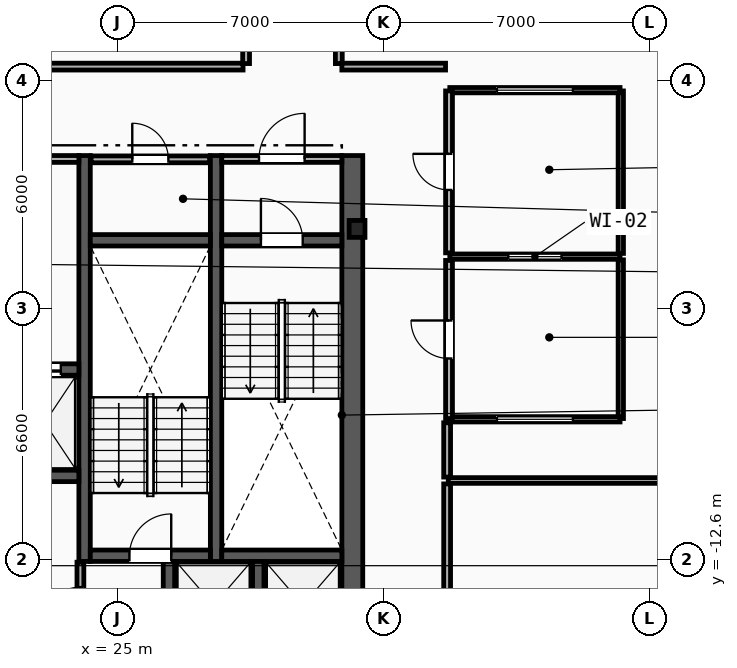
"""IFC4 building model, lengths in metres.
Left out: names, types, materials, properties, quantities, classifications, styles, units other than length and angle.
Written with IfcOpenShell. Run it as: python <this file> out.ifc"""

import sys

from ifc_helpers import new_model, si_unit, direction, frame, frame_2d, origin, origin_2d, place, context, subcontext, project, spatial, rectangle, i_section, extrude, element, fill, save


model = new_model("IFC4")
c1 = context("Model", 3, precision=1e-05, world=origin(), true_north=direction((0.0, 1.0)))
c2 = subcontext(c1, "Body", "Model", "MODEL_VIEW")
j1 = project(units=[si_unit("LENGTHUNIT", "METRE"), si_unit("PLANEANGLEUNIT", "RADIAN")], contexts=[c1])
p1 = place(None, origin())
s1 = spatial("IfcSite", under=j1, at=p1, CompositionType="ELEMENT")
p2 = place(p1, origin())
s2 = spatial("IfcBuilding", under=s1, at=p2, CompositionType="ELEMENT")
p3 = place(p2, frame((0.0, 0.0, 257.6)))
s3 = spatial("IfcBuildingStorey", under=s2, at=p3, CompositionType="ELEMENT", Elevation=257.6)
p4 = place(p3, frame((31.3, -3.9, 0.0), z_axis=(0.0, 0.0, 1.0), x_axis=(1.0, 0.0, 0.0)))
e1 = element("IfcColumn", 1, at=p4, inside=s3, PredefinedType="COLUMN", context=c2, shape_type="SweptSolid", body=[
    extrude(i_section(OverallWidth=0.416, OverallDepth=0.446, WebThickness=0.039, FlangeThickness=0.063, FilletRadius=0.018, at=origin_2d()), origin(), (0.0, 0.0, 1.0), 3.6),
])
p5 = place(p3, frame((31.175, -15.3, 0.0), z_axis=(0.0, 0.0, 1.0), x_axis=(0.0, 1.0, 0.0)))
e2 = element("IfcWall", 2, at=p5, inside=s3, PredefinedType="SHEAR", context=c2, shape_type="SweptSolid", body=[
    extrude(rectangle(XDim=13.33, YDim=0.55, at=frame_2d((6.665, 0.0))), origin(), (0.0, 0.0, 1.0), 3.34),
])
for number, where, z_axis, x_axis in (
    (3, (27.59, -12.65, 0.0), (0.0, 0.0, 1.0), (0.0, 1.0, 0.0)),
    (4, (24.13, -12.65, 0.0), (0.0, 0.0, 1.0), (0.0, 1.0, 0.0)),
):
    element("IfcWall", number, at=place(p3, frame(where, z_axis=z_axis, x_axis=x_axis)), inside=s3, PredefinedType="SHEAR", context=c2, shape_type="SweptSolid", body=[
        extrude(rectangle(XDim=10.68, YDim=0.3, at=frame_2d((5.34, 0.0))), origin(), (0.0, 0.0, 1.0), 3.34),
    ])
p6 = place(p3, frame((27.74, -4.2, 0.0), z_axis=(0.0, 0.0, 1.0), x_axis=(1.0, 0.0, 0.0)))
e5 = element("IfcWall", 5, at=p6, inside=s3, PredefinedType="SHEAR", context=c2, shape_type="SweptSolid", body=[
    extrude(rectangle(XDim=3.16, YDim=0.3, at=frame_2d((1.58, 0.0))), origin(), (0.0, 0.0, 1.0), 3.34),
])
p7 = place(p6, frame((1.03, 0.0, 0.0)))
e6 = element("IfcOpeningElement", 6, at=p7, cuts=e5, PredefinedType="OPENING", context=c2, shape_type="SweptSolid", body=[
    extrude(rectangle(XDim=1.1, YDim=2.15, at=frame_2d((0.55, 1.075))), frame((0.0, 0.16, 0.0), z_axis=(0.0, -1.0, 0.0), x_axis=(1.0, 0.0, 0.0)), (0.0, 0.0, 1.0), 0.32),
])
p8 = place(p3, frame((27.74, -12.5, 0.0), z_axis=(0.0, 0.0, 1.0), x_axis=(1.0, 0.0, 0.0)))
e7 = element("IfcWall", 7, at=p8, inside=s3, PredefinedType="SHEAR", context=c2, shape_type="SweptSolid", body=[
    extrude(rectangle(XDim=3.16, YDim=0.3, at=frame_2d((1.58, 0.0))), origin(), (0.0, 0.0, 1.0), 3.34),
])
p9 = place(p3, frame((24.28, -12.5, 0.0), z_axis=(0.0, 0.0, 1.0), x_axis=(1.0, 0.0, 0.0)))
e8 = element("IfcWall", 8, at=p9, inside=s3, PredefinedType="SHEAR", context=c2, shape_type="SweptSolid", body=[
    extrude(rectangle(XDim=3.16, YDim=0.3, at=frame_2d((1.58, 0.0))), origin(), (0.0, 0.0, 1.0), 3.34),
])
p10 = place(p9, frame((1.03, 0.0, 0.0)))
e9 = element("IfcOpeningElement", 9, at=p10, cuts=e8, PredefinedType="OPENING", context=c2, shape_type="SweptSolid", body=[
    extrude(rectangle(XDim=1.1, YDim=2.15, at=frame_2d((0.55, 1.075))), frame((0.0, 0.16, 0.0), z_axis=(0.0, -1.0, 0.0), x_axis=(1.0, 0.0, 0.0)), (0.0, 0.0, 1.0), 0.32),
])
p11 = place(p3, frame((24.28, -4.2, 0.0), z_axis=(0.0, 0.0, 1.0), x_axis=(1.0, 0.0, 0.0)))
e10 = element("IfcWall", 10, at=p11, inside=s3, PredefinedType="SHEAR", context=c2, shape_type="SweptSolid", body=[
    extrude(rectangle(XDim=3.16, YDim=0.3, at=frame_2d((1.58, 0.0))), origin(), (0.0, 0.0, 1.0), 3.34),
])
p12 = place(p3, frame((20.98, -2.06, 0.0), z_axis=(0.0, 0.0, 1.0), x_axis=(1.0, 0.0, 0.0)))
e11 = element("IfcWall", 11, at=p12, inside=s3, PredefinedType="PARTITIONING", context=c2, shape_type="SweptSolid", body=[
    extrude(rectangle(XDim=3.0, YDim=0.18, at=frame_2d((1.5, 0.0))), origin(), (0.0, 0.0, 1.0), 3.34),
])
p13 = place(p12, frame((0.9, 0.0, 0.0)))
e12 = element("IfcOpeningElement", 12, at=p13, cuts=e11, PredefinedType="OPENING", context=c2, shape_type="SweptSolid", body=[
    extrude(rectangle(XDim=1.2, YDim=2.15, at=frame_2d((0.6, 1.075))), frame((0.0, 0.1, 0.0), z_axis=(0.0, -1.0, 0.0), x_axis=(1.0, 0.0, 0.0)), (0.0, 0.0, 1.0), 0.2),
])
p14 = place(p3, frame((27.74, -2.06, 0.0), z_axis=(0.0, 0.0, 1.0), x_axis=(1.0, 0.0, 0.0)))
e13 = element("IfcWall", 13, at=p14, inside=s3, PredefinedType="PARTITIONING", context=c2, shape_type="SweptSolid", body=[
    extrude(rectangle(XDim=3.16, YDim=0.18, at=frame_2d((1.58, 0.0))), origin(), (0.0, 0.0, 1.0), 3.34),
])
p15 = place(p14, frame((0.98, 0.0, 0.0)))
e14 = element("IfcOpeningElement", 14, at=p15, cuts=e13, PredefinedType="OPENING", context=c2, shape_type="SweptSolid", body=[
    extrude(rectangle(XDim=1.2, YDim=2.15, at=frame_2d((0.6, 1.075))), frame((0.0, 0.1, 0.0), z_axis=(0.0, -1.0, 0.0), x_axis=(1.0, 0.0, 0.0)), (0.0, 0.0, 1.0), 0.2),
])
p16 = place(p3, frame((21.88, -7.6, 0.0), z_axis=(0.0, 0.0, 1.0), x_axis=(1.0, 0.0, 0.0)))
e15 = element("IfcWall", 15, at=p16, inside=s3, PredefinedType="SHEAR", context=c2, shape_type="SweptSolid", body=[
    extrude(rectangle(XDim=2.1, YDim=0.3, at=frame_2d((1.05, 0.0))), origin(), (0.0, 0.0, 1.0), 3.34),
])
p17 = place(p16, frame((0.475, 0.0, 0.0)))
e16 = element("IfcOpeningElement", 16, at=p17, cuts=e15, PredefinedType="OPENING", context=c2, shape_type="SweptSolid", body=[
    extrude(rectangle(XDim=1.15, YDim=2.2, at=frame_2d((0.575, 1.1))), frame((0.0, 0.16, 0.0), z_axis=(0.0, -1.0, 0.0), x_axis=(1.0, 0.0, 0.0)), (0.0, 0.0, 1.0), 0.32),
])
p18 = place(p3, frame((21.88, -10.4, 0.0), z_axis=(0.0, 0.0, 1.0), x_axis=(1.0, 0.0, 0.0)))
e17 = element("IfcWall", 17, at=p18, inside=s3, PredefinedType="SHEAR", context=c2, shape_type="SweptSolid", body=[
    extrude(rectangle(XDim=2.1, YDim=0.3, at=frame_2d((1.05, 0.0))), origin(), (0.0, 0.0, 1.0), 3.34),
])
for number, where, z_axis, x_axis in (
    (18, (28.7, -14.95, 0.0), (0.0, 0.0, 1.0), (0.0, 1.0, 0.0)),
    (19, (26.35, -14.95, 0.0), (0.0, 0.0, 1.0), (0.0, 1.0, 0.0)),
):
    element("IfcWall", number, at=place(p3, frame(where, z_axis=z_axis, x_axis=x_axis)), inside=s3, PredefinedType="SHEAR", context=c2, shape_type="SweptSolid", body=[
        extrude(rectangle(XDim=2.3, YDim=0.3, at=frame_2d((1.15, 0.0))), origin(), (0.0, 0.0, 1.0), 3.34),
    ])
p19 = place(p3, frame((24.3, -2.07, 0.0), z_axis=(0.0, 0.0, 1.0), x_axis=(1.0, 0.0, 0.0)))
e20 = element("IfcWall", 20, at=p19, inside=s3, PredefinedType="PARTITIONING", context=c2, shape_type="SweptSolid", body=[
    extrude(rectangle(XDim=3.12, YDim=0.18, at=frame_2d((1.56, 0.0))), origin(), (0.0, 0.0, 1.0), 3.34),
])
p20 = place(p19, frame((1.085, 0.0, 0.0)))
e21 = element("IfcOpeningElement", 21, at=p20, cuts=e20, PredefinedType="OPENING", context=c2, shape_type="SweptSolid", body=[
    extrude(rectangle(XDim=0.95, YDim=2.1, at=frame_2d((0.475, 1.05))), frame((0.0, 0.1, 0.0), z_axis=(0.0, -1.0, 0.0), x_axis=(1.0, 0.0, 0.0)), (0.0, 0.0, 1.0), 0.2),
])
p21 = place(p3, frame((24.02, -14.93, 0.0), z_axis=(0.0, 0.0, 1.0), x_axis=(0.0, 1.0, 0.0)))
e22 = element("IfcWall", 22, at=p21, inside=s3, PredefinedType="PARTITIONING", context=c2, shape_type="SweptSolid", body=[
    extrude(rectangle(XDim=2.26, YDim=0.18, at=frame_2d((1.13, 0.0))), origin(), (0.0, 0.0, 1.0), 3.34),
])
p22 = place(p21, frame((0.655, 0.0, 0.0)))
e23 = element("IfcOpeningElement", 23, at=p22, cuts=e22, PredefinedType="OPENING", context=c2, shape_type="SweptSolid", body=[
    extrude(rectangle(XDim=0.95, YDim=2.1, at=frame_2d((0.475, 1.05))), frame((0.0, 0.1, 0.0), z_axis=(0.0, -1.0, 0.0), x_axis=(1.0, 0.0, 0.0)), (0.0, 0.0, 1.0), 0.2),
])
p23 = place(p3, frame((38.24, -8.89, 0.0), z_axis=(0.0, 0.0, 1.0), x_axis=(0.0, 1.0, 0.0)))
e24 = element("IfcWall", 24, at=p23, inside=s3, PredefinedType="PARTITIONING", context=c2, shape_type="SweptSolid", body=[
    extrude(rectangle(XDim=4.175, YDim=0.14, at=frame_2d((2.087, 0.0))), origin(), (0.0, 0.0, 1.0), 3.34),
])
p24 = place(p3, frame((38.24, -4.545, 0.0), z_axis=(0.0, 0.0, 1.0), x_axis=(0.0, 1.0, 0.0)))
e25 = element("IfcWall", 25, at=p24, inside=s3, PredefinedType="PARTITIONING", context=c2, shape_type="SweptSolid", body=[
    extrude(rectangle(XDim=4.275, YDim=0.14, at=frame_2d((2.137, 0.0))), origin(), (0.0, 0.0, 1.0), 3.34),
])
p25 = place(p3, frame((33.74, -0.25, 0.0), z_axis=(0.0, 0.0, 1.0), x_axis=(1.0, 0.0, 0.0)))
e26 = element("IfcWall", 26, at=p25, inside=s3, PredefinedType="PARTITIONING", context=c2, shape_type="SweptSolid", body=[
    extrude(rectangle(XDim=4.48, YDim=0.14, at=frame_2d((2.24, 0.0))), origin(), (0.0, 0.0, 1.0), 3.34),
])
p26 = place(p25, frame((1.24, 0.0, 1.05)))
e27 = element("IfcOpeningElement", 27, at=p26, cuts=e26, PredefinedType="OPENING", context=c2, shape_type="SweptSolid", body=[
    extrude(rectangle(XDim=2.0, YDim=1.5, at=frame_2d((1.0, 0.75))), frame((0.0, 0.08, 0.0), z_axis=(0.0, -1.0, 0.0), x_axis=(1.0, 0.0, 0.0)), (0.0, 0.0, 1.0), 0.16),
])
p27 = place(p3, frame((33.74, -4.63, 0.0), z_axis=(0.0, 0.0, 1.0), x_axis=(1.0, 0.0, 0.0)))
e28 = element("IfcWall", 28, at=p27, inside=s3, PredefinedType="PARTITIONING", context=c2, shape_type="SweptSolid", body=[
    extrude(rectangle(XDim=4.48, YDim=0.14, at=frame_2d((2.24, 0.0))), origin(), (0.0, 0.0, 1.0), 3.34),
])
p28 = place(p27, frame((1.54, 0.0, 1.05)))
e29 = element("IfcOpeningElement", 29, at=p28, cuts=e28, PredefinedType="OPENING", context=c2, shape_type="SweptSolid", body=[
    extrude(rectangle(XDim=1.4, YDim=1.5, at=frame_2d((0.7, 0.75))), frame((0.0, 0.08, 0.0), z_axis=(0.0, -1.0, 0.0), x_axis=(1.0, 0.0, 0.0)), (0.0, 0.0, 1.0), 0.16),
])
p29 = place(p3, frame((33.74, -8.91, 0.0), z_axis=(0.0, 0.0, 1.0), x_axis=(1.0, 0.0, 0.0)))
e30 = element("IfcWall", 30, at=p29, inside=s3, PredefinedType="PARTITIONING", context=c2, shape_type="SweptSolid", body=[
    extrude(rectangle(XDim=4.48, YDim=0.14, at=frame_2d((2.24, 0.0))), origin(), (0.0, 0.0, 1.0), 3.34),
])
p30 = place(p29, frame((1.24, 0.0, 1.05)))
e31 = element("IfcOpeningElement", 31, at=p30, cuts=e30, PredefinedType="OPENING", context=c2, shape_type="SweptSolid", body=[
    extrude(rectangle(XDim=2.0, YDim=1.5, at=frame_2d((1.0, 0.75))), frame((0.0, 0.08, 0.0), z_axis=(0.0, -1.0, 0.0), x_axis=(1.0, 0.0, 0.0)), (0.0, 0.0, 1.0), 0.16),
])
p31 = place(p3, frame((33.72, -4.53, 0.0), z_axis=(0.0, 0.0, 1.0), x_axis=(0.0, 1.0, 0.0)))
e32 = element("IfcWall", 32, at=p31, inside=s3, PredefinedType="PARTITIONING", context=c2, shape_type="SweptSolid", body=[
    extrude(rectangle(XDim=4.26, YDim=0.18, at=frame_2d((2.13, 0.0))), origin(), (0.0, 0.0, 1.0), 3.34),
])
p32 = place(p31, frame((1.655, 0.0, 0.0)))
e33 = element("IfcOpeningElement", 33, at=p32, cuts=e32, PredefinedType="OPENING", context=c2, shape_type="SweptSolid", body=[
    extrude(rectangle(XDim=0.95, YDim=2.1, at=frame_2d((0.475, 1.05))), frame((0.0, 0.1, 0.0), z_axis=(0.0, -1.0, 0.0), x_axis=(1.0, 0.0, 0.0)), (0.0, 0.0, 1.0), 0.2),
])
p33 = place(p3, frame((33.72, -8.89, 0.0), z_axis=(0.0, 0.0, 1.0), x_axis=(0.0, 1.0, 0.0)))
e34 = element("IfcWall", 34, at=p33, inside=s3, PredefinedType="PARTITIONING", context=c2, shape_type="SweptSolid", body=[
    extrude(rectangle(XDim=4.16, YDim=0.18, at=frame_2d((2.08, 0.0))), origin(), (0.0, 0.0, 1.0), 3.34),
])
p34 = place(p33, frame((1.58, 0.0, 0.0)))
e35 = element("IfcOpeningElement", 35, at=p34, cuts=e34, PredefinedType="OPENING", context=c2, shape_type="SweptSolid", body=[
    extrude(rectangle(XDim=1.0, YDim=2.15, at=frame_2d((0.5, 1.075))), frame((0.0, 0.1, 0.0), z_axis=(0.0, -1.0, 0.0), x_axis=(1.0, 0.0, 0.0)), (0.0, 0.0, 1.0), 0.2),
])
p35 = place(p3, frame((33.7, -10.52, 0.0), z_axis=(0.0, 0.0, 1.0), x_axis=(1.0, 0.0, 0.0)))
e36 = element("IfcWall", 36, at=p35, inside=s3, PredefinedType="PARTITIONING", context=c2, shape_type="SweptSolid", body=[
    extrude(rectangle(XDim=16.444, YDim=0.15, at=frame_2d((8.222, 0.0))), origin(), (0.0, 0.0, 1.0), 3.34),
])
p36 = place(p3, frame((33.67, -17.428, 0.0), z_axis=(0.0, 0.0, 1.0), x_axis=(0.0, 1.0, 0.0)))
e37 = element("IfcWall", 37, at=p36, inside=s3, PredefinedType="PARTITIONING", context=c2, shape_type="SweptSolid", body=[
    extrude(rectangle(XDim=6.818, YDim=0.18, at=frame_2d((3.409, 0.0))), origin(), (0.0, 0.0, 1.0), 3.34),
])
p37 = place(p36, frame((2.909, 0.0, 0.0)))
e38 = element("IfcOpeningElement", 38, at=p37, cuts=e37, PredefinedType="OPENING", context=c2, shape_type="SweptSolid", body=[
    extrude(rectangle(XDim=1.0, YDim=2.15, at=frame_2d((0.5, 1.075))), frame((0.0, 0.1, 0.0), z_axis=(0.0, -1.0, 0.0), x_axis=(1.0, 0.0, 0.0)), (0.0, 0.0, 1.0), 0.2),
])
p38 = place(p3, frame((30.82, 0.45, 0.0), z_axis=(0.0, 0.0, 1.0), x_axis=(0.0, 1.0, 0.0)))
e39 = element("IfcWall", 39, at=p38, inside=s3, PredefinedType="PARTITIONING", context=c2, shape_type="SweptSolid", body=[
    extrude(rectangle(XDim=9.54, YDim=0.18, at=frame_2d((4.77, 0.0))), origin(), (0.0, 0.0, 1.0), 3.34),
])
p39 = place(p38, frame((4.27, 0.0, 0.0)))
e40 = element("IfcOpeningElement", 40, at=p39, cuts=e39, PredefinedType="OPENING", context=c2, shape_type="SweptSolid", body=[
    extrude(rectangle(XDim=1.0, YDim=2.15, at=frame_2d((0.5, 1.075))), frame((0.0, 0.1, 0.0), z_axis=(0.0, -1.0, 0.0), x_axis=(1.0, 0.0, 0.0)), (0.0, 0.0, 1.0), 0.2),
])
p40 = place(p3, frame((33.628, 0.37, 0.0), z_axis=(0.0, 0.0, 1.0), x_axis=(-1.0, 0.0, 0.0)))
e41 = element("IfcWall", 41, at=p40, inside=s3, PredefinedType="PARTITIONING", context=c2, shape_type="SweptSolid", body=[
    extrude(rectangle(XDim=2.729, YDim=0.18, at=frame_2d((1.364, 0.0))), origin(), (0.0, 0.0, 1.0), 3.34),
])
p41 = place(p3, frame((33.67, -10.43, 0.0), z_axis=(0.0, 0.0, 1.0), x_axis=(0.0, 1.0, 0.0)))
e42 = element("IfcWall", 42, at=p41, inside=s3, PredefinedType="PARTITIONING", context=c2, shape_type="SweptSolid", body=[
    extrude(rectangle(XDim=1.428, YDim=0.18, at=frame_2d((0.714, 0.0))), origin(), (0.0, 0.0, 1.0), 3.34),
])
p42 = place(p3, frame((28.3, 0.37, 0.0), z_axis=(0.0, 0.0, 1.0), x_axis=(-1.0, 0.0, 0.0)))
e43 = element("IfcWall", 43, at=p42, inside=s3, PredefinedType="PARTITIONING", context=c2, shape_type="SweptSolid", body=[
    extrude(rectangle(XDim=11.4, YDim=0.18, at=frame_2d((5.7, 0.0))), origin(), (0.0, 0.0, 1.0), 3.34),
])
p43 = place(p42, frame((5.2, 0.0, 0.0)))
e44 = element("IfcOpeningElement", 44, at=p43, cuts=e43, PredefinedType="OPENING", context=c2, shape_type="SweptSolid", body=[
    extrude(rectangle(XDim=1.0, YDim=2.15, at=frame_2d((0.5, 1.075))), frame((0.0, 0.1, 0.0), z_axis=(0.0, -1.0, 0.0), x_axis=(1.0, 0.0, 0.0)), (0.0, 0.0, 1.0), 0.2),
])
p44 = place(p3, frame((28.38, 9.99, 0.0), z_axis=(0.0, 0.0, 1.0), x_axis=(0.0, -1.0, 0.0)))
e45 = element("IfcWall", 45, at=p44, inside=s3, PredefinedType="PARTITIONING", context=c2, shape_type="SweptSolid", body=[
    extrude(rectangle(XDim=9.54, YDim=0.18, at=frame_2d((4.77, 0.0))), origin(), (0.0, 0.0, 1.0), 3.34),
])
p45 = place(p44, frame((3.77, 0.0, 1.05)))
e46 = element("IfcOpeningElement", 46, at=p45, cuts=e45, PredefinedType="OPENING", context=c2, shape_type="SweptSolid", body=[
    extrude(rectangle(XDim=2.0, YDim=1.5, at=frame_2d((1.0, 0.75))), frame((0.0, 0.1, 0.0), z_axis=(0.0, -1.0, 0.0), x_axis=(1.0, 0.0, 0.0)), (0.0, 0.0, 1.0), 0.2),
])
p46 = place(p7, origin())
e47 = element("IfcDoor", 47, at=p46, inside=s3, OperationType="SINGLE_SWING_LEFT", PredefinedType="DOOR", context=c2, shape_type="SweptSolid", body=[
    extrude(rectangle(XDim=1.1, YDim=2.15, at=frame_2d((0.55, 1.075))), frame((0.0, 0.025, 0.0), z_axis=(0.0, -1.0, 0.0), x_axis=(1.0, 0.0, 0.0)), (0.0, 0.0, 1.0), 0.05),
])
fill(e6, e47)
p47 = place(p10, origin())
e48 = element("IfcDoor", 48, at=p47, inside=s3, OperationType="SINGLE_SWING_RIGHT", PredefinedType="DOOR", context=c2, shape_type="SweptSolid", body=[
    extrude(rectangle(XDim=1.1, YDim=2.15, at=frame_2d((0.55, 1.075))), frame((0.0, 0.025, 0.0), z_axis=(0.0, -1.0, 0.0), x_axis=(1.0, 0.0, 0.0)), (0.0, 0.0, 1.0), 0.05),
])
fill(e9, e48)
p48 = place(p15, origin())
e49 = element("IfcDoor", 49, at=p48, inside=s3, OperationType="SINGLE_SWING_RIGHT", PredefinedType="DOOR", context=c2, shape_type="SweptSolid", body=[
    extrude(rectangle(XDim=1.2, YDim=2.15, at=frame_2d((0.6, 1.075))), frame((0.0, 0.025, 0.0), z_axis=(0.0, -1.0, 0.0), x_axis=(1.0, 0.0, 0.0)), (0.0, 0.0, 1.0), 0.05),
])
fill(e14, e49)
p49 = place(p17, origin())
e50 = element("IfcDoor", 50, at=p49, inside=s3, OperationType="SLIDING_TO_LEFT", PredefinedType="TRAPDOOR", context=c2, shape_type="SweptSolid", body=[
    extrude(rectangle(XDim=1.15, YDim=2.2, at=frame_2d((0.575, 1.1))), frame((0.0, 0.025, 0.0), z_axis=(0.0, -1.0, 0.0), x_axis=(1.0, 0.0, 0.0)), (0.0, 0.0, 1.0), 0.05),
])
fill(e16, e50)
p50 = place(p32, origin())
e51 = element("IfcDoor", 51, at=p50, inside=s3, OperationType="SINGLE_SWING_RIGHT", PredefinedType="DOOR", context=c2, shape_type="SweptSolid", body=[
    extrude(rectangle(XDim=0.95, YDim=2.1, at=frame_2d((0.475, 1.05))), frame((0.0, 0.025, 0.0), z_axis=(0.0, -1.0, 0.0), x_axis=(1.0, 0.0, 0.0)), (0.0, 0.0, 1.0), 0.05),
])
fill(e33, e51)
p51 = place(p34, origin())
e52 = element("IfcDoor", 52, at=p51, inside=s3, OperationType="SINGLE_SWING_RIGHT", PredefinedType="DOOR", context=c2, shape_type="SweptSolid", body=[
    extrude(rectangle(XDim=1.0, YDim=2.15, at=frame_2d((0.5, 1.075))), frame((0.0, 0.025, 0.0), z_axis=(0.0, -1.0, 0.0), x_axis=(1.0, 0.0, 0.0)), (0.0, 0.0, 1.0), 0.05),
])
fill(e35, e52)
p52 = place(p20, origin())
e53 = element("IfcDoor", 53, at=p52, inside=s3, OperationType="SINGLE_SWING_LEFT", PredefinedType="DOOR", context=c2, shape_type="SweptSolid", body=[
    extrude(rectangle(XDim=0.95, YDim=2.1, at=frame_2d((0.475, 1.05))), frame((0.0, 0.025, 0.0), z_axis=(0.0, -1.0, 0.0), x_axis=(1.0, 0.0, 0.0)), (0.0, 0.0, 1.0), 0.05),
])
fill(e21, e53)
p53 = place(p22, origin())
e54 = element("IfcDoor", 54, at=p53, inside=s3, OperationType="SINGLE_SWING_LEFT", PredefinedType="DOOR", context=c2, shape_type="SweptSolid", body=[
    extrude(rectangle(XDim=0.95, YDim=2.1, at=frame_2d((0.475, 1.05))), frame((0.0, 0.025, 0.0), z_axis=(0.0, -1.0, 0.0), x_axis=(1.0, 0.0, 0.0)), (0.0, 0.0, 1.0), 0.05),
])
fill(e23, e54)
p54 = place(p26, origin())
e55 = element("IfcWindow", 55, at=p54, inside=s3, PartitioningType="SINGLE_PANEL", PredefinedType="WINDOW", context=c2, shape_type="SweptSolid", body=[
    extrude(rectangle(XDim=2.0, YDim=1.5, at=frame_2d((1.0, 0.75))), frame((0.0, 0.03, 0.0), z_axis=(0.0, -1.0, 0.0), x_axis=(1.0, 0.0, 0.0)), (0.0, 0.0, 1.0), 0.06),
])
fill(e27, e55)
p55 = place(p28, origin())
e56 = element("IfcWindow", 56, at=p55, inside=s3, PartitioningType="SINGLE_PANEL", PredefinedType="WINDOW", context=c2, shape_type="SweptSolid", body=[
    extrude(rectangle(XDim=1.4, YDim=1.5, at=frame_2d((0.7, 0.75))), frame((0.0, 0.03, 0.0), z_axis=(0.0, -1.0, 0.0), x_axis=(1.0, 0.0, 0.0)), (0.0, 0.0, 1.0), 0.06),
])
fill(e29, e56)
p56 = place(p30, origin())
e57 = element("IfcWindow", 57, at=p56, inside=s3, PartitioningType="SINGLE_PANEL", PredefinedType="WINDOW", context=c2, shape_type="SweptSolid", body=[
    extrude(rectangle(XDim=2.0, YDim=1.5, at=frame_2d((1.0, 0.75))), frame((0.0, 0.03, 0.0), z_axis=(0.0, -1.0, 0.0), x_axis=(1.0, 0.0, 0.0)), (0.0, 0.0, 1.0), 0.06),
])
fill(e31, e57)
save(model, sys.argv[1])
